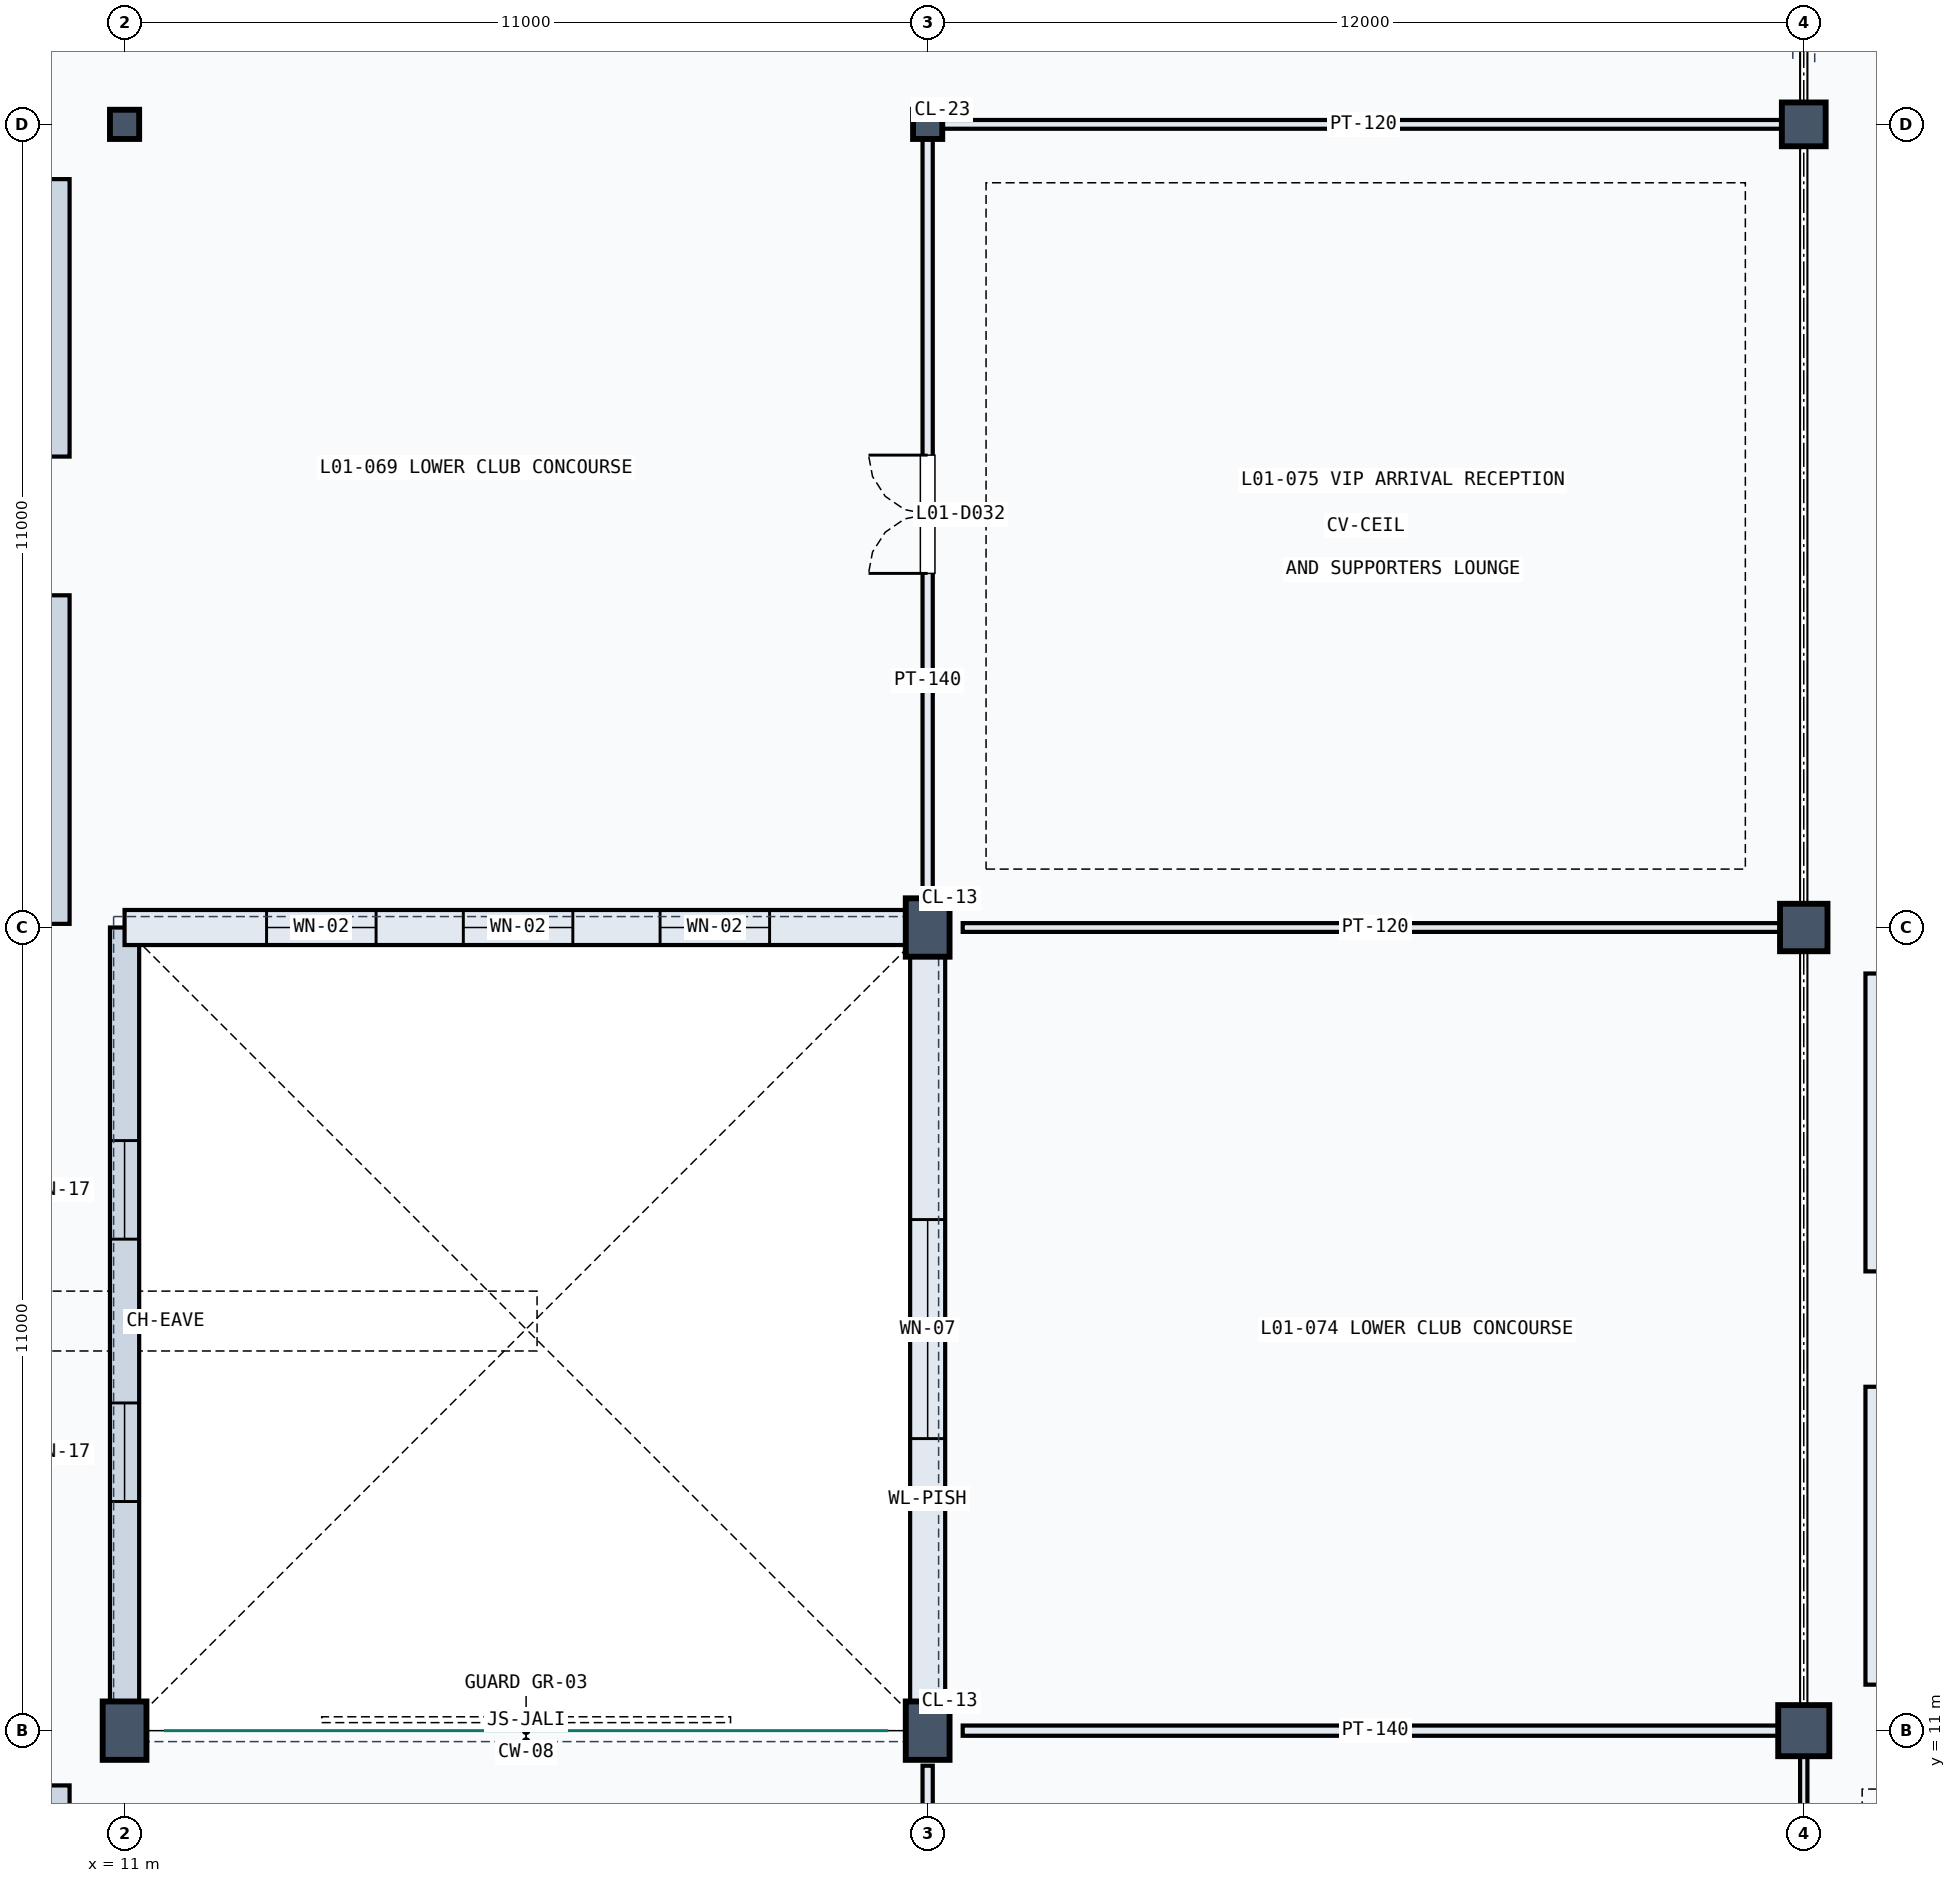
"""IFC4 building model, lengths in metres.
Left out: names, types, materials, properties, quantities, classifications, styles, units other than length and angle.
Written with IfcOpenShell. Run it as: python <this file> out.ifc"""

import sys

from ifc_helpers import new_model, si_unit, direction, frame, frame_2d, origin, origin_2d, place, context, subcontext, project, spatial, rectangle, hollow_rectangle, extrude, element, fill, save


model = new_model("IFC4")
c1 = context("Model", 3, precision=1e-05, world=origin(), true_north=direction((0.0, 1.0)))
c2 = subcontext(c1, "Body", "Model", "MODEL_VIEW")
j1 = project(units=[si_unit("LENGTHUNIT", "METRE"), si_unit("PLANEANGLEUNIT", "RADIAN")], contexts=[c1])
p1 = place(None, origin())
s1 = spatial("IfcSite", under=j1, at=p1, CompositionType="ELEMENT")
p2 = place(p1, origin())
s2 = spatial("IfcBuilding", under=s1, at=p2, CompositionType="ELEMENT")
p3 = place(p2, frame((0.0, 0.0, 5.4)))
s3 = spatial("IfcBuildingStorey", under=s2, at=p3, CompositionType="ELEMENT", Elevation=5.4)
p4 = place(p3, frame((11.0, 11.0, 0.0), z_axis=(0.0, 0.0, 1.0), x_axis=(1.0, 0.0, 0.0)))
e1 = element("IfcColumn", 1, at=p4, inside=s3, PredefinedType="COLUMN", context=c2, shape_type="SweptSolid", body=[
    extrude(rectangle(XDim=0.6, YDim=0.8, at=origin_2d()), origin(), (0.0, 0.0, 1.0), 4.8),
])
p5 = place(p3, frame((11.0, 33.0, 0.0), z_axis=(0.0, 0.0, 1.0), x_axis=(1.0, 0.0, 0.0)))
e2 = element("IfcColumn", 2, at=p5, inside=s3, PredefinedType="COLUMN", context=c2, shape_type="SweptSolid", body=[
    extrude(hollow_rectangle(XDim=0.4, YDim=0.4, WallThickness=0.02, at=origin_2d()), origin(), (0.0, 0.0, 1.0), 4.8),
])
for number, where, z_axis, x_axis in (
    (3, (22.0, 11.0, 0.0), (0.0, 0.0, 1.0), (1.0, 0.0, 0.0)),
    (4, (22.0, 22.0, 0.0), (0.0, 0.0, 1.0), (1.0, 0.0, 0.0)),
):
    element("IfcColumn", number, at=place(p3, frame(where, z_axis=z_axis, x_axis=x_axis)), inside=s3, PredefinedType="COLUMN", context=c2, shape_type="SweptSolid", body=[
        extrude(rectangle(XDim=0.6, YDim=0.8, at=origin_2d()), origin(), (0.0, 0.0, 1.0), 4.8),
    ])
p6 = place(p3, frame((22.0, 33.0, 0.0), z_axis=(0.0, 0.0, 1.0), x_axis=(1.0, 0.0, 0.0)))
e5 = element("IfcColumn", 5, at=p6, inside=s3, PredefinedType="COLUMN", context=c2, shape_type="SweptSolid", body=[
    extrude(hollow_rectangle(XDim=0.4, YDim=0.4, WallThickness=0.02, at=origin_2d()), origin(), (0.0, 0.0, 1.0), 4.8),
])
p7 = place(p3, frame((34.0, 11.0, 0.0), z_axis=(0.0, 0.0, 1.0), x_axis=(1.0, 0.0, 0.0)))
e6 = element("IfcColumn", 6, at=p7, inside=s3, PredefinedType="COLUMN", context=c2, shape_type="SweptSolid", body=[
    extrude(rectangle(XDim=0.7, YDim=0.7, at=origin_2d()), origin(), (0.0, 0.0, 1.0), 4.8),
])
p8 = place(p3, frame((34.0, 22.0, 0.0), z_axis=(0.0, 0.0, 1.0), x_axis=(1.0, 0.0, 0.0)))
e7 = element("IfcColumn", 7, at=p8, inside=s3, PredefinedType="COLUMN", context=c2, shape_type="SweptSolid", body=[
    extrude(rectangle(XDim=0.65, YDim=0.65, at=origin_2d()), origin(), (0.0, 0.0, 1.0), 4.8),
])
p9 = place(p3, frame((34.0, 33.0, 0.0), z_axis=(0.0, 0.0, 1.0), x_axis=(1.0, 0.0, 0.0)))
e8 = element("IfcColumn", 8, at=p9, inside=s3, PredefinedType="COLUMN", context=c2, shape_type="SweptSolid", body=[
    extrude(rectangle(XDim=0.6, YDim=0.6, at=origin_2d()), origin(), (0.0, 0.0, 1.0), 4.8),
])
p10 = place(p3, frame((11.0, 11.22, 0.0), z_axis=(0.0, 0.0, 1.0), x_axis=(0.0, 1.0, 0.0)))
e9 = element("IfcWall", 9, at=p10, inside=s3, PredefinedType="SOLIDWALL", context=c2, shape_type="SweptSolid", body=[
    extrude(rectangle(XDim=10.78, YDim=0.4, at=frame_2d((5.39, 0.0))), origin(), (0.0, 0.0, 1.0), 3.69),
])
p11 = place(p10, frame((2.918, 0.0, 0.8)))
e10 = element("IfcOpeningElement", 10, at=p11, cuts=e9, PredefinedType="OPENING", context=c2, shape_type="SweptSolid", body=[
    extrude(rectangle(XDim=1.35, YDim=2.1, at=frame_2d((0.675, 1.05))), frame((0.0, 0.21, 0.0), z_axis=(0.0, -1.0, 0.0), x_axis=(1.0, 0.0, 0.0)), (0.0, 0.0, 1.0), 0.42),
])
p12 = place(p10, frame((6.512, 0.0, 0.8)))
e11 = element("IfcOpeningElement", 11, at=p12, cuts=e9, PredefinedType="OPENING", context=c2, shape_type="SweptSolid", body=[
    extrude(rectangle(XDim=1.35, YDim=2.1, at=frame_2d((0.675, 1.05))), frame((0.0, 0.21, 0.0), z_axis=(0.0, -1.0, 0.0), x_axis=(1.0, 0.0, 0.0)), (0.0, 0.0, 1.0), 0.42),
])
p13 = place(p3, frame((11.0, 22.0, 0.0), z_axis=(0.0, 0.0, 1.0), x_axis=(1.0, 0.0, 0.0)))
e12 = element("IfcWall", 12, at=p13, inside=s3, PredefinedType="SOLIDWALL", context=c2, shape_type="SweptSolid", body=[
    extrude(rectangle(XDim=10.78, YDim=0.48, at=frame_2d((5.39, 0.0))), origin(), (0.0, 0.0, 1.0), 3.778),
])
p14 = place(p13, frame((1.945, 0.0, 0.85)))
e13 = element("IfcOpeningElement", 13, at=p14, cuts=e12, PredefinedType="OPENING", context=c2, shape_type="SweptSolid", body=[
    extrude(rectangle(XDim=1.5, YDim=2.1, at=frame_2d((0.75, 1.05))), frame((0.0, 0.25, 0.0), z_axis=(0.0, -1.0, 0.0), x_axis=(1.0, 0.0, 0.0)), (0.0, 0.0, 1.0), 0.5),
])
p15 = place(p13, frame((4.64, 0.0, 0.85)))
e14 = element("IfcOpeningElement", 14, at=p15, cuts=e12, PredefinedType="OPENING", context=c2, shape_type="SweptSolid", body=[
    extrude(rectangle(XDim=1.5, YDim=2.1, at=frame_2d((0.75, 1.05))), frame((0.0, 0.25, 0.0), z_axis=(0.0, -1.0, 0.0), x_axis=(1.0, 0.0, 0.0)), (0.0, 0.0, 1.0), 0.5),
])
p16 = place(p13, frame((7.335, 0.0, 0.85)))
e15 = element("IfcOpeningElement", 15, at=p16, cuts=e12, PredefinedType="OPENING", context=c2, shape_type="SweptSolid", body=[
    extrude(rectangle(XDim=1.5, YDim=2.1, at=frame_2d((0.75, 1.05))), frame((0.0, 0.25, 0.0), z_axis=(0.0, -1.0, 0.0), x_axis=(1.0, 0.0, 0.0)), (0.0, 0.0, 1.0), 0.5),
])
p17 = place(p3, frame((22.0, 11.22, 0.0), z_axis=(0.0, 0.0, 1.0), x_axis=(0.0, 1.0, 0.0)))
e16 = element("IfcWall", 16, at=p17, inside=s3, PredefinedType="SOLIDWALL", context=c2, shape_type="SweptSolid", body=[
    extrude(rectangle(XDim=10.56, YDim=0.48, at=frame_2d((5.28, 0.0))), origin(), (0.0, 0.0, 1.0), 3.707),
])
p18 = place(p17, frame((3.78, 0.0, 0.9)))
e17 = element("IfcOpeningElement", 17, at=p18, cuts=e16, PredefinedType="OPENING", context=c2, shape_type="SweptSolid", body=[
    extrude(rectangle(XDim=3.0, YDim=1.8, at=frame_2d((1.5, 0.9))), frame((0.0, 0.25, 0.0), z_axis=(0.0, -1.0, 0.0), x_axis=(1.0, 0.0, 0.0)), (0.0, 0.0, 1.0), 0.5),
])
for number, where, z_axis, x_axis in (
    (18, (34.96, 11.63, 0.0), (0.0, 0.0, 1.0), (0.0, 1.0, 0.0)),
    (19, (34.96, 17.29, 0.0), (0.0, 0.0, 1.0), (0.0, 1.0, 0.0)),
):
    element("IfcWall", number, at=place(p3, frame(where, z_axis=z_axis, x_axis=x_axis)), inside=s3, PredefinedType="SOLIDWALL", context=c2, shape_type="SweptSolid", body=[
        extrude(rectangle(XDim=4.08, YDim=0.23, at=frame_2d((2.04, 0.0))), origin(), (0.0, 0.0, 1.0), 3.79),
    ])
p19 = place(p3, frame((10.072, 22.05, 0.0), z_axis=(0.0, 0.0, 1.0), x_axis=(0.0, 1.0, 0.0)))
e20 = element("IfcWall", 20, at=p19, inside=s3, PredefinedType="SOLIDWALL", context=c2, shape_type="SweptSolid", body=[
    extrude(rectangle(XDim=4.5, YDim=0.35, at=frame_2d((2.25, 0.0))), origin(), (0.0, 0.0, 1.0), 4.46),
])
for number, where, z_axis, x_axis in (
    (21, (10.072, 28.45, 0.0), (0.0, 0.0, 1.0), (0.0, 1.0, 0.0)),
    (22, (10.072, 6.45, 0.0), (0.0, 0.0, 1.0), (0.0, 1.0, 0.0)),
):
    element("IfcWall", number, at=place(p3, frame(where, z_axis=z_axis, x_axis=x_axis)), inside=s3, PredefinedType="SOLIDWALL", context=c2, shape_type="SweptSolid", body=[
        extrude(rectangle(XDim=3.8, YDim=0.35, at=frame_2d((1.9, 0.0))), origin(), (0.0, 0.0, 1.0), 4.46),
    ])
p20 = place(p3, frame((22.0, 2.7, 0.0), z_axis=(0.0, 0.0, 1.0), x_axis=(0.0, 1.0, 0.0)))
e23 = element("IfcWall", 23, at=p20, inside=s3, PredefinedType="PARTITIONING", context=c2, shape_type="SweptSolid", body=[
    extrude(rectangle(XDim=7.82, YDim=0.14, at=frame_2d((3.91, 0.0))), origin(), (0.0, 0.0, 1.0), 3.707),
])
p21 = place(p20, frame((3.43, 0.0, 0.0)))
e24 = element("IfcOpeningElement", 24, at=p21, cuts=e23, PredefinedType="OPENING", context=c2, shape_type="SweptSolid", body=[
    extrude(rectangle(XDim=0.96, YDim=2.15, at=frame_2d((0.48, 1.075))), frame((0.0, 0.08, 0.0), z_axis=(0.0, -1.0, 0.0), x_axis=(1.0, 0.0, 0.0)), (0.0, 0.0, 1.0), 0.16),
])
p22 = place(p3, frame((22.0, 22.48, 0.0), z_axis=(0.0, 0.0, 1.0), x_axis=(0.0, 1.0, 0.0)))
e25 = element("IfcWall", 25, at=p22, inside=s3, PredefinedType="PARTITIONING", context=c2, shape_type="SweptSolid", body=[
    extrude(rectangle(XDim=10.36, YDim=0.14, at=frame_2d((5.18, 0.0))), origin(), (0.0, 0.0, 1.0), 3.778),
])
p23 = place(p22, frame((4.37, 0.0, 0.0)))
e26 = element("IfcOpeningElement", 26, at=p23, cuts=e25, PredefinedType="OPENING", context=c2, shape_type="SweptSolid", body=[
    extrude(rectangle(XDim=1.62, YDim=2.25, at=frame_2d((0.81, 1.125))), frame((0.0, 0.08, 0.0), z_axis=(0.0, -1.0, 0.0), x_axis=(1.0, 0.0, 0.0)), (0.0, 0.0, 1.0), 0.16),
])
p24 = place(p3, frame((22.48, 11.0, 0.0), z_axis=(0.0, 0.0, 1.0), x_axis=(1.0, 0.0, 0.0)))
e27 = element("IfcWall", 27, at=p24, inside=s3, PredefinedType="PARTITIONING", context=c2, shape_type="SweptSolid", body=[
    extrude(rectangle(XDim=11.3, YDim=0.14, at=frame_2d((5.65, 0.0))), origin(), (0.0, 0.0, 1.0), 3.49),
])
p25 = place(p3, frame((22.48, 22.0, 0.0), z_axis=(0.0, 0.0, 1.0), x_axis=(1.0, 0.0, 0.0)))
e28 = element("IfcWall", 28, at=p25, inside=s3, PredefinedType="PARTITIONING", context=c2, shape_type="SweptSolid", body=[
    extrude(rectangle(XDim=11.3, YDim=0.12, at=frame_2d((5.65, 0.0))), origin(), (0.0, 0.0, 1.0), 3.44),
])
p26 = place(p3, frame((22.16, 33.0, 0.0), z_axis=(0.0, 0.0, 1.0), x_axis=(1.0, 0.0, 0.0)))
e29 = element("IfcWall", 29, at=p26, inside=s3, PredefinedType="PARTITIONING", context=c2, shape_type="SweptSolid", body=[
    extrude(rectangle(XDim=11.62, YDim=0.12, at=frame_2d((5.81, 0.0))), origin(), (0.0, 0.0, 1.0), 3.44),
])
p27 = place(p3, frame((34.0, 0.48, 0.0), z_axis=(0.0, 0.0, 1.0), x_axis=(0.0, 1.0, 0.0)))
e30 = element("IfcWall", 30, at=p27, inside=s3, PredefinedType="PARTITIONING", context=c2, shape_type="SweptSolid", body=[
    extrude(rectangle(XDim=10.3, YDim=0.1, at=frame_2d((5.15, 0.0))), origin(), (0.0, 0.0, 1.0), 3.49),
])
p28 = place(p11, origin())
e31 = element("IfcWindow", 31, at=p28, inside=s3, PartitioningType="SINGLE_PANEL", PredefinedType="WINDOW", context=c2, shape_type="SweptSolid", body=[
    extrude(rectangle(XDim=1.35, YDim=2.1, at=frame_2d((0.675, 1.05))), frame((0.0, 0.03, 0.0), z_axis=(0.0, -1.0, 0.0), x_axis=(1.0, 0.0, 0.0)), (0.0, 0.0, 1.0), 0.06),
])
fill(e10, e31)
p29 = place(p12, origin())
e32 = element("IfcWindow", 32, at=p29, inside=s3, PartitioningType="SINGLE_PANEL", PredefinedType="WINDOW", context=c2, shape_type="SweptSolid", body=[
    extrude(rectangle(XDim=1.35, YDim=2.1, at=frame_2d((0.675, 1.05))), frame((0.0, 0.03, 0.0), z_axis=(0.0, -1.0, 0.0), x_axis=(1.0, 0.0, 0.0)), (0.0, 0.0, 1.0), 0.06),
])
fill(e11, e32)
p30 = place(p14, origin())
e33 = element("IfcWindow", 33, at=p30, inside=s3, PartitioningType="SINGLE_PANEL", PredefinedType="WINDOW", context=c2, shape_type="SweptSolid", body=[
    extrude(rectangle(XDim=1.5, YDim=2.1, at=frame_2d((0.75, 1.05))), frame((0.0, 0.03, 0.0), z_axis=(0.0, -1.0, 0.0), x_axis=(1.0, 0.0, 0.0)), (0.0, 0.0, 1.0), 0.06),
])
fill(e13, e33)
p31 = place(p15, origin())
e34 = element("IfcWindow", 34, at=p31, inside=s3, PartitioningType="SINGLE_PANEL", PredefinedType="WINDOW", context=c2, shape_type="SweptSolid", body=[
    extrude(rectangle(XDim=1.5, YDim=2.1, at=frame_2d((0.75, 1.05))), frame((0.0, 0.03, 0.0), z_axis=(0.0, -1.0, 0.0), x_axis=(1.0, 0.0, 0.0)), (0.0, 0.0, 1.0), 0.06),
])
fill(e14, e34)
p32 = place(p16, origin())
e35 = element("IfcWindow", 35, at=p32, inside=s3, PartitioningType="SINGLE_PANEL", PredefinedType="WINDOW", context=c2, shape_type="SweptSolid", body=[
    extrude(rectangle(XDim=1.5, YDim=2.1, at=frame_2d((0.75, 1.05))), frame((0.0, 0.03, 0.0), z_axis=(0.0, -1.0, 0.0), x_axis=(1.0, 0.0, 0.0)), (0.0, 0.0, 1.0), 0.06),
])
fill(e15, e35)
p33 = place(p18, origin())
e36 = element("IfcWindow", 36, at=p33, inside=s3, PartitioningType="SINGLE_PANEL", PredefinedType="WINDOW", context=c2, shape_type="SweptSolid", body=[
    extrude(rectangle(XDim=3.0, YDim=1.8, at=frame_2d((1.5, 0.9))), frame((0.0, 0.03, 0.0), z_axis=(0.0, -1.0, 0.0), x_axis=(1.0, 0.0, 0.0)), (0.0, 0.0, 1.0), 0.06),
])
fill(e17, e36)
p34 = place(p23, origin())
e37 = element("IfcDoor", 37, at=p34, inside=s3, OperationType="DOUBLE_DOOR_SINGLE_SWING", PredefinedType="DOOR", context=c2, shape_type="SweptSolid", body=[
    extrude(rectangle(XDim=1.62, YDim=2.25, at=frame_2d((0.81, 1.125))), frame((0.0, 0.025, 0.0), z_axis=(0.0, -1.0, 0.0), x_axis=(1.0, 0.0, 0.0)), (0.0, 0.0, 1.0), 0.05),
])
fill(e26, e37)
save(model, sys.argv[1])
